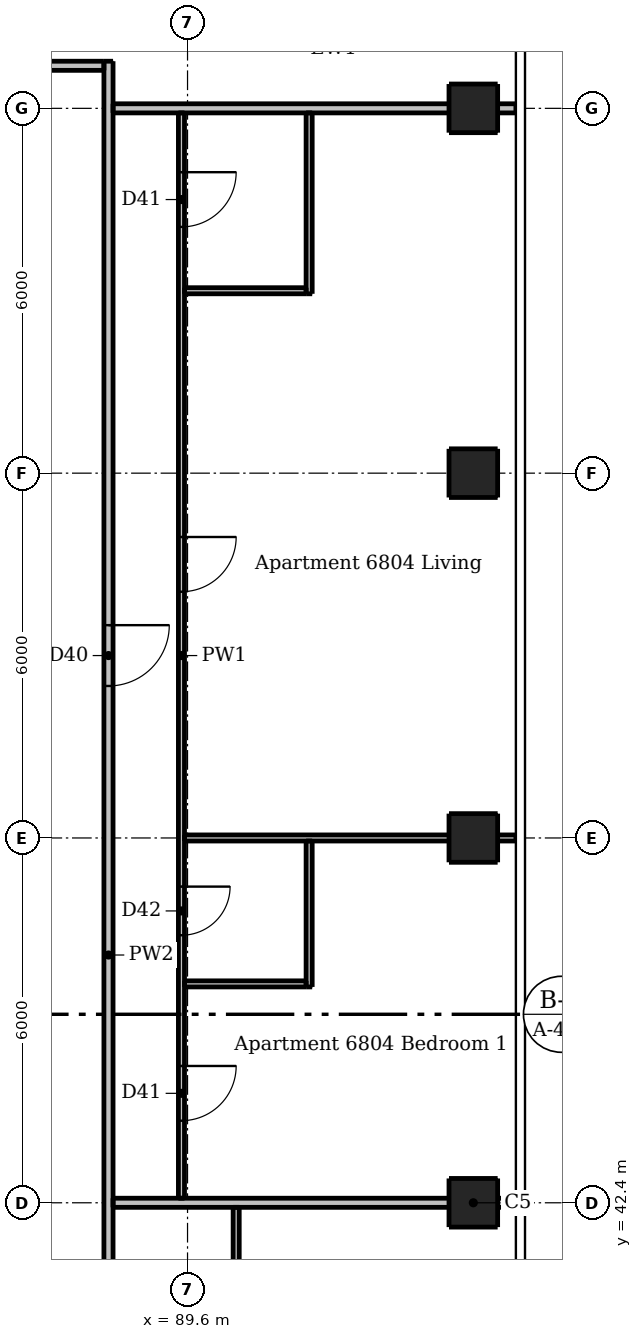
"""IFC4 building model, lengths in metres.
Left out: names, types, materials, properties, quantities, classifications, styles, units other than length and angle.
Written with IfcOpenShell. Run it as: python <this file> out.ifc"""

import sys

from ifc_helpers import new_model, si_unit, direction, frame, frame_2d, origin, origin_2d, place, context, subcontext, project, spatial, rectangle, extrude, element, fill, save


model = new_model("IFC4")
c1 = context("Model", 3, precision=1e-05, world=origin(), true_north=direction((0.0, 1.0)))
c2 = subcontext(c1, "Body", "Model", "MODEL_VIEW")
j1 = project(units=[si_unit("LENGTHUNIT", "METRE"), si_unit("PLANEANGLEUNIT", "RADIAN")], contexts=[c1])
p1 = place(None, origin())
s1 = spatial("IfcSite", under=j1, at=p1, CompositionType="ELEMENT")
p2 = place(p1, origin())
s2 = spatial("IfcBuilding", under=s1, at=p2, CompositionType="ELEMENT")
p3 = place(p2, frame((0.0, 0.0, 255.4)))
s3 = spatial("IfcBuildingStorey", under=s2, at=p3, CompositionType="ELEMENT", Elevation=255.4)
for number, where, z_axis, x_axis in (
    (1, (94.3, 42.4, 0.0), (0.0, 0.0, 1.0), (1.0, 0.0, 0.0)),
    (2, (94.3, 48.4, 0.0), (0.0, 0.0, 1.0), (1.0, 0.0, 0.0)),
    (3, (94.3, 54.4, 0.0), (0.0, 0.0, 1.0), (1.0, 0.0, 0.0)),
    (4, (94.3, 60.4, 0.0), (0.0, 0.0, 1.0), (1.0, 0.0, 0.0)),
):
    element("IfcColumn", number, at=place(p3, frame(where, z_axis=z_axis, x_axis=x_axis)), inside=s3, PredefinedType="COLUMN", context=c2, shape_type="SweptSolid", body=[
        extrude(rectangle(XDim=0.8, YDim=0.8, at=origin_2d()), origin(), (0.0, 0.0, 1.0), 3.05),
    ])
p4 = place(p3, frame((89.5, 60.325, 0.0), z_axis=(0.0, 0.0, 1.0), x_axis=(0.0, -1.0, 0.0)))
e5 = element("IfcWall", 5, at=p4, inside=s3, PredefinedType="PARTITIONING", context=c2, shape_type="SweptSolid", body=[
    extrude(rectangle(XDim=17.85, YDim=0.1, at=frame_2d((8.925, 0.0))), origin(), (0.0, 0.0, 1.0), 3.05),
])
p5 = place(p4, frame((6.975, 0.0, 0.0)))
e6 = element("IfcOpeningElement", 6, at=p5, cuts=e5, PredefinedType="OPENING", context=c2, shape_type="SweptSolid", body=[
    extrude(rectangle(XDim=0.9, YDim=2.1, at=frame_2d((0.45, 1.05))), frame((0.0, 0.06, 0.0), z_axis=(0.0, -1.0, 0.0), x_axis=(1.0, 0.0, 0.0)), (0.0, 0.0, 1.0), 0.12),
])
p6 = place(p4, frame((0.975, 0.0, 0.0)))
e7 = element("IfcOpeningElement", 7, at=p6, cuts=e5, PredefinedType="OPENING", context=c2, shape_type="SweptSolid", body=[
    extrude(rectangle(XDim=0.9, YDim=2.1, at=frame_2d((0.45, 1.05))), frame((0.0, 0.06, 0.0), z_axis=(0.0, -1.0, 0.0), x_axis=(1.0, 0.0, 0.0)), (0.0, 0.0, 1.0), 0.12),
])
p7 = place(p4, frame((15.675, 0.0, 0.0)))
e8 = element("IfcOpeningElement", 8, at=p7, cuts=e5, PredefinedType="OPENING", context=c2, shape_type="SweptSolid", body=[
    extrude(rectangle(XDim=0.9, YDim=2.1, at=frame_2d((0.45, 1.05))), frame((0.0, 0.06, 0.0), z_axis=(0.0, -1.0, 0.0), x_axis=(1.0, 0.0, 0.0)), (0.0, 0.0, 1.0), 0.12),
])
p8 = place(p4, frame((12.725, 0.0, 0.0)))
e9 = element("IfcOpeningElement", 9, at=p8, cuts=e5, PredefinedType="OPENING", context=c2, shape_type="SweptSolid", body=[
    extrude(rectangle(XDim=0.8, YDim=2.1, at=frame_2d((0.4, 1.05))), frame((0.0, 0.06, 0.0), z_axis=(0.0, -1.0, 0.0), x_axis=(1.0, 0.0, 0.0)), (0.0, 0.0, 1.0), 0.12),
])
p9 = place(p3, frame((90.4, 35.65, 0.0), z_axis=(0.0, 0.0, 1.0), x_axis=(0.0, 1.0, 0.0)))
e10 = element("IfcWall", 10, at=p9, inside=s3, PredefinedType="PARTITIONING", context=c2, shape_type="SweptSolid", body=[
    extrude(rectangle(XDim=6.675, YDim=0.1, at=frame_2d((3.337, 0.0))), origin(), (0.0, 0.0, 1.0), 3.05),
])
p10 = place(p9, frame((4.15, 0.0, 0.0)))
e11 = element("IfcOpeningElement", 11, at=p10, cuts=e10, PredefinedType="OPENING", context=c2, shape_type="SweptSolid", body=[
    extrude(rectangle(XDim=0.8, YDim=2.1, at=frame_2d((0.4, 1.05))), frame((0.0, 0.06, 0.0), z_axis=(0.0, -1.0, 0.0), x_axis=(1.0, 0.0, 0.0)), (0.0, 0.0, 1.0), 0.12),
])
p11 = place(p3, frame((91.6, 45.95, 0.0), z_axis=(0.0, 0.0, 1.0), x_axis=(0.0, 1.0, 0.0)))
e12 = element("IfcWall", 12, at=p11, inside=s3, PredefinedType="PARTITIONING", context=c2, shape_type="SweptSolid", body=[
    extrude(rectangle(XDim=2.4, YDim=0.1, at=frame_2d((1.2, 0.0))), origin(), (0.0, 0.0, 1.0), 3.05),
])
p12 = place(p3, frame((91.6, 57.35, 0.0), z_axis=(0.0, 0.0, 1.0), x_axis=(0.0, 1.0, 0.0)))
e13 = element("IfcWall", 13, at=p12, inside=s3, PredefinedType="PARTITIONING", context=c2, shape_type="SweptSolid", body=[
    extrude(rectangle(XDim=2.975, YDim=0.1, at=frame_2d((1.487, 0.0))), origin(), (0.0, 0.0, 1.0), 3.05),
])
p13 = place(p3, frame((89.55, 57.4, 0.0), z_axis=(0.0, 0.0, 1.0), x_axis=(1.0, 0.0, 0.0)))
e14 = element("IfcWall", 14, at=p13, inside=s3, PredefinedType="PARTITIONING", context=c2, shape_type="SweptSolid", body=[
    extrude(rectangle(XDim=2.0, YDim=0.1, at=frame_2d((1.0, 0.0))), origin(), (0.0, 0.0, 1.0), 3.05),
])
p14 = place(p3, frame((89.55, 48.4, 0.0), z_axis=(0.0, 0.0, 1.0), x_axis=(1.0, 0.0, 0.0)))
e15 = element("IfcWall", 15, at=p14, inside=s3, PredefinedType="PARTITIONING", context=c2, shape_type="SweptSolid", body=[
    extrude(rectangle(XDim=5.45, YDim=0.1, at=frame_2d((2.725, 0.0))), origin(), (0.0, 0.0, 1.0), 2.59),
])
p15 = place(p3, frame((89.55, 46.0, 0.0), z_axis=(0.0, 0.0, 1.0), x_axis=(1.0, 0.0, 0.0)))
e16 = element("IfcWall", 16, at=p15, inside=s3, PredefinedType="PARTITIONING", context=c2, shape_type="SweptSolid", body=[
    extrude(rectangle(XDim=2.0, YDim=0.1, at=frame_2d((1.0, 0.0))), origin(), (0.0, 0.0, 1.0), 3.05),
])
p16 = place(p3, frame((88.3, 61.175, 0.0), z_axis=(0.0, 0.0, 1.0), x_axis=(0.0, -1.0, 0.0)))
e17 = element("IfcWall", 17, at=p16, inside=s3, PredefinedType="PARTITIONING", context=c2, shape_type="SweptSolid", body=[
    extrude(rectangle(XDim=29.4, YDim=0.15, at=frame_2d((14.7, 0.0))), origin(), (0.0, 0.0, 1.0), 3.05),
])
p17 = place(p16, frame((27.025, 0.0, 0.0)))
e18 = element("IfcOpeningElement", 18, at=p17, cuts=e17, PredefinedType="OPENING", context=c2, shape_type="SweptSolid", body=[
    extrude(rectangle(XDim=1.0, YDim=2.1, at=frame_2d((0.5, 1.05))), frame((0.0, 0.085, 0.0), z_axis=(0.0, -1.0, 0.0), x_axis=(1.0, 0.0, 0.0)), (0.0, 0.0, 1.0), 0.17),
])
p18 = place(p16, frame((9.275, 0.0, 0.0)))
e19 = element("IfcOpeningElement", 19, at=p18, cuts=e17, PredefinedType="OPENING", context=c2, shape_type="SweptSolid", body=[
    extrude(rectangle(XDim=1.0, YDim=2.1, at=frame_2d((0.5, 1.05))), frame((0.0, 0.085, 0.0), z_axis=(0.0, -1.0, 0.0), x_axis=(1.0, 0.0, 0.0)), (0.0, 0.0, 1.0), 0.17),
])
p19 = place(p3, frame((58.975, 61.1, 0.0), z_axis=(0.0, 0.0, 1.0), x_axis=(1.0, 0.0, 0.0)))
e20 = element("IfcWall", 20, at=p19, inside=s3, PredefinedType="PARTITIONING", context=c2, shape_type="SweptSolid", body=[
    extrude(rectangle(XDim=29.25, YDim=0.15, at=frame_2d((14.625, 0.0))), origin(), (0.0, 0.0, 1.0), 3.05),
])
p20 = place(p19, frame((9.125, 0.0, 0.0)))
e21 = element("IfcOpeningElement", 21, at=p20, cuts=e20, PredefinedType="OPENING", context=c2, shape_type="SweptSolid", body=[
    extrude(rectangle(XDim=1.0, YDim=2.1, at=frame_2d((0.5, 1.05))), frame((0.0, 0.085, 0.0), z_axis=(0.0, -1.0, 0.0), x_axis=(1.0, 0.0, 0.0)), (0.0, 0.0, 1.0), 0.17),
])
p21 = place(p19, frame((26.475, 0.0, 0.0)))
e22 = element("IfcOpeningElement", 22, at=p21, cuts=e20, PredefinedType="OPENING", context=c2, shape_type="SweptSolid", body=[
    extrude(rectangle(XDim=1.0, YDim=2.1, at=frame_2d((0.5, 1.05))), frame((0.0, 0.085, 0.0), z_axis=(0.0, -1.0, 0.0), x_axis=(1.0, 0.0, 0.0)), (0.0, 0.0, 1.0), 0.17),
])
p22 = place(p3, frame((88.375, 60.4, 0.0), z_axis=(0.0, 0.0, 1.0), x_axis=(1.0, 0.0, 0.0)))
e23 = element("IfcWall", 23, at=p22, inside=s3, PredefinedType="PARTITIONING", context=c2, shape_type="SweptSolid", body=[
    extrude(rectangle(XDim=6.625, YDim=0.15, at=frame_2d((3.312, 0.0))), origin(), (0.0, 0.0, 1.0), 2.647),
])
p23 = place(p3, frame((88.375, 42.4, 0.0), z_axis=(0.0, 0.0, 1.0), x_axis=(1.0, 0.0, 0.0)))
e24 = element("IfcWall", 24, at=p23, inside=s3, PredefinedType="PARTITIONING", context=c2, shape_type="SweptSolid", body=[
    extrude(rectangle(XDim=6.625, YDim=0.15, at=frame_2d((3.312, 0.0))), origin(), (0.0, 0.0, 1.0), 2.59),
])
p24 = place(p18, origin())
e25 = element("IfcDoor", 25, at=p24, inside=s3, OperationType="SINGLE_SWING_LEFT", PredefinedType="DOOR", context=c2, shape_type="SweptSolid", body=[
    extrude(rectangle(XDim=1.0, YDim=2.1, at=frame_2d((0.5, 1.05))), frame((0.0, 0.025, 0.0), z_axis=(0.0, -1.0, 0.0), x_axis=(1.0, 0.0, 0.0)), (0.0, 0.0, 1.0), 0.05),
])
fill(e19, e25)
p25 = place(p5, origin())
e26 = element("IfcDoor", 26, at=p25, inside=s3, OperationType="SINGLE_SWING_LEFT", PredefinedType="DOOR", context=c2, shape_type="SweptSolid", body=[
    extrude(rectangle(XDim=0.9, YDim=2.1, at=frame_2d((0.45, 1.05))), frame((0.0, 0.025, 0.0), z_axis=(0.0, -1.0, 0.0), x_axis=(1.0, 0.0, 0.0)), (0.0, 0.0, 1.0), 0.05),
])
fill(e6, e26)
p26 = place(p6, origin())
e27 = element("IfcDoor", 27, at=p26, inside=s3, OperationType="SINGLE_SWING_LEFT", PredefinedType="DOOR", context=c2, shape_type="SweptSolid", body=[
    extrude(rectangle(XDim=0.9, YDim=2.1, at=frame_2d((0.45, 1.05))), frame((0.0, 0.025, 0.0), z_axis=(0.0, -1.0, 0.0), x_axis=(1.0, 0.0, 0.0)), (0.0, 0.0, 1.0), 0.05),
])
fill(e7, e27)
p27 = place(p7, origin())
e28 = element("IfcDoor", 28, at=p27, inside=s3, OperationType="SINGLE_SWING_LEFT", PredefinedType="DOOR", context=c2, shape_type="SweptSolid", body=[
    extrude(rectangle(XDim=0.9, YDim=2.1, at=frame_2d((0.45, 1.05))), frame((0.0, 0.025, 0.0), z_axis=(0.0, -1.0, 0.0), x_axis=(1.0, 0.0, 0.0)), (0.0, 0.0, 1.0), 0.05),
])
fill(e8, e28)
p28 = place(p8, origin())
e29 = element("IfcDoor", 29, at=p28, inside=s3, OperationType="SINGLE_SWING_LEFT", PredefinedType="DOOR", context=c2, shape_type="SweptSolid", body=[
    extrude(rectangle(XDim=0.8, YDim=2.1, at=frame_2d((0.4, 1.05))), frame((0.0, 0.025, 0.0), z_axis=(0.0, -1.0, 0.0), x_axis=(1.0, 0.0, 0.0)), (0.0, 0.0, 1.0), 0.05),
])
fill(e9, e29)
save(model, sys.argv[1])
